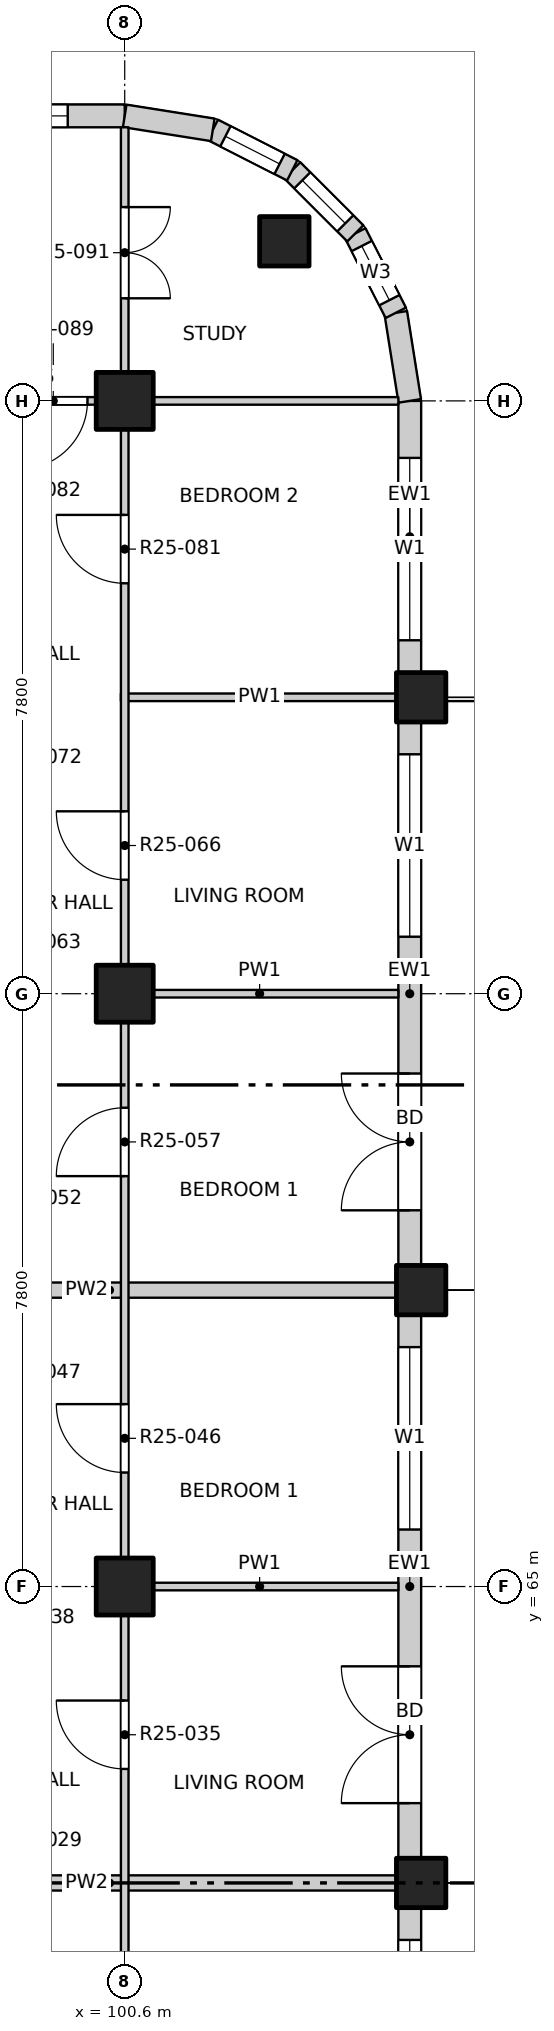
"""IFC4 building model, lengths in metres.
Left out: names, types, materials, properties, quantities, classifications, styles, units other than length and angle.
Written with IfcOpenShell. Run it as: python <this file> out.ifc"""

import sys

from ifc_helpers import new_model, si_unit, direction, frame, frame_2d, origin, origin_2d, place, context, subcontext, project, spatial, rectangle, extrude, element, fill, save


model = new_model("IFC4")
c1 = context("Model", 3, precision=1e-05, world=origin(), true_north=direction((0.0, 1.0)))
c2 = subcontext(c1, "Body", "Model", "MODEL_VIEW")
j1 = project(units=[si_unit("LENGTHUNIT", "METRE"), si_unit("PLANEANGLEUNIT", "RADIAN")], contexts=[c1])
p1 = place(None, origin())
s1 = spatial("IfcSite", under=j1, at=p1, CompositionType="ELEMENT")
p2 = place(p1, origin())
s2 = spatial("IfcBuilding", under=s1, at=p2, CompositionType="ELEMENT")
p3 = place(p2, frame((0.0, 0.0, 252.8)))
s3 = spatial("IfcBuildingStorey", under=s2, at=p3, CompositionType="ELEMENT", Elevation=252.8)
for number, where, z_axis, x_axis in (
    (1, (102.7, 82.7, -0.25), (0.0, 0.0, 1.0), (1.0, 0.0, 0.0)),
    (2, (104.5, 61.1, -0.25), (0.0, 0.0, 1.0), (1.0, 0.0, 0.0)),
    (3, (104.5, 68.9, -0.25), (0.0, 0.0, 1.0), (1.0, 0.0, 0.0)),
    (4, (104.5, 76.7, -0.25), (0.0, 0.0, 1.0), (1.0, 0.0, 0.0)),
):
    element("IfcColumn", number, at=place(p3, frame(where, z_axis=z_axis, x_axis=x_axis)), inside=s3, PredefinedType="COLUMN", context=c2, shape_type="SweptSolid", body=[
        extrude(rectangle(XDim=0.65, YDim=0.65, at=origin_2d()), origin(), (0.0, 0.0, 1.0), 3.4),
    ])
for number, where, z_axis, x_axis in (
    (5, (100.6, 65.0, -0.25), (0.0, 0.0, 1.0), (1.0, 0.0, 0.0)),
    (6, (100.6, 72.8, -0.25), (0.0, 0.0, 1.0), (1.0, 0.0, 0.0)),
    (7, (100.6, 80.6, -0.25), (0.0, 0.0, 1.0), (1.0, 0.0, 0.0)),
):
    element("IfcColumn", number, at=place(p3, frame(where, z_axis=z_axis, x_axis=x_axis)), inside=s3, PredefinedType="COLUMN", context=c2, shape_type="SweptSolid", body=[
        extrude(rectangle(XDim=0.75, YDim=0.75, at=origin_2d()), origin(), (0.0, 0.0, 1.0), 3.4),
    ])
p4 = place(p3, frame((104.35, 53.625, 0.0), z_axis=(0.0, 0.0, 1.0), x_axis=(0.0, 1.0, 0.0)))
e8 = element("IfcWall", 8, at=p4, inside=s3, PredefinedType="SOLIDWALL", context=c2, shape_type="SweptSolid", body=[
    extrude(rectangle(XDim=7.15, YDim=0.3, at=frame_2d((3.575, 0.0))), origin(), (0.0, 0.0, 1.0), 2.7),
])
p5 = place(p4, frame((0.725, 0.0, 0.0)))
e9 = element("IfcOpeningElement", 9, at=p5, cuts=e8, PredefinedType="OPENING", context=c2, shape_type="SweptSolid", body=[
    extrude(rectangle(XDim=1.8, YDim=2.4, at=frame_2d((0.9, 1.2))), frame((0.0, 0.16, 0.0), z_axis=(0.0, -1.0, 0.0), x_axis=(1.0, 0.0, 0.0)), (0.0, 0.0, 1.0), 0.32),
])
p6 = place(p4, frame((4.325, 0.0, 0.9)))
e10 = element("IfcOpeningElement", 10, at=p6, cuts=e8, PredefinedType="OPENING", context=c2, shape_type="SweptSolid", body=[
    extrude(rectangle(XDim=2.4, YDim=1.8, at=frame_2d((1.2, 0.9))), frame((0.0, 0.16, 0.0), z_axis=(0.0, -1.0, 0.0), x_axis=(1.0, 0.0, 0.0)), (0.0, 0.0, 1.0), 0.32),
])
p7 = place(p3, frame((104.35, 61.425, 0.0), z_axis=(0.0, 0.0, 1.0), x_axis=(0.0, 1.0, 0.0)))
e11 = element("IfcWall", 11, at=p7, inside=s3, PredefinedType="SOLIDWALL", context=c2, shape_type="SweptSolid", body=[
    extrude(rectangle(XDim=7.15, YDim=0.3, at=frame_2d((3.575, 0.0))), origin(), (0.0, 0.0, 1.0), 2.7),
])
p8 = place(p7, frame((0.725, 0.0, 0.0)))
e12 = element("IfcOpeningElement", 12, at=p8, cuts=e11, PredefinedType="OPENING", context=c2, shape_type="SweptSolid", body=[
    extrude(rectangle(XDim=1.8, YDim=2.4, at=frame_2d((0.9, 1.2))), frame((0.0, 0.16, 0.0), z_axis=(0.0, -1.0, 0.0), x_axis=(1.0, 0.0, 0.0)), (0.0, 0.0, 1.0), 0.32),
])
p9 = place(p7, frame((4.325, 0.0, 0.9)))
e13 = element("IfcOpeningElement", 13, at=p9, cuts=e11, PredefinedType="OPENING", context=c2, shape_type="SweptSolid", body=[
    extrude(rectangle(XDim=2.4, YDim=1.8, at=frame_2d((1.2, 0.9))), frame((0.0, 0.16, 0.0), z_axis=(0.0, -1.0, 0.0), x_axis=(1.0, 0.0, 0.0)), (0.0, 0.0, 1.0), 0.32),
])
p10 = place(p3, frame((104.35, 69.225, 0.0), z_axis=(0.0, 0.0, 1.0), x_axis=(0.0, 1.0, 0.0)))
e14 = element("IfcWall", 14, at=p10, inside=s3, PredefinedType="SOLIDWALL", context=c2, shape_type="SweptSolid", body=[
    extrude(rectangle(XDim=7.15, YDim=0.3, at=frame_2d((3.575, 0.0))), origin(), (0.0, 0.0, 1.0), 2.7),
])
p11 = place(p10, frame((0.725, 0.0, 0.0)))
e15 = element("IfcOpeningElement", 15, at=p11, cuts=e14, PredefinedType="OPENING", context=c2, shape_type="SweptSolid", body=[
    extrude(rectangle(XDim=1.8, YDim=2.4, at=frame_2d((0.9, 1.2))), frame((0.0, 0.16, 0.0), z_axis=(0.0, -1.0, 0.0), x_axis=(1.0, 0.0, 0.0)), (0.0, 0.0, 1.0), 0.32),
])
p12 = place(p10, frame((4.325, 0.0, 0.9)))
e16 = element("IfcOpeningElement", 16, at=p12, cuts=e14, PredefinedType="OPENING", context=c2, shape_type="SweptSolid", body=[
    extrude(rectangle(XDim=2.4, YDim=1.8, at=frame_2d((1.2, 0.9))), frame((0.0, 0.16, 0.0), z_axis=(0.0, -1.0, 0.0), x_axis=(1.0, 0.0, 0.0)), (0.0, 0.0, 1.0), 0.32),
])
p13 = place(p3, frame((104.35, 77.025, 0.0), z_axis=(0.0, 0.0, 1.0), x_axis=(0.0, 1.0, 0.0)))
e17 = element("IfcWall", 17, at=p13, inside=s3, PredefinedType="SOLIDWALL", context=c2, shape_type="SweptSolid", body=[
    extrude(rectangle(XDim=3.575, YDim=0.3, at=frame_2d((1.788, 0.0))), origin(), (0.0, 0.0, 1.0), 2.7),
])
p14 = place(p13, frame((0.425, 0.0, 0.9)))
e18 = element("IfcOpeningElement", 18, at=p14, cuts=e17, PredefinedType="OPENING", context=c2, shape_type="SweptSolid", body=[
    extrude(rectangle(XDim=2.4, YDim=1.8, at=frame_2d((1.2, 0.9))), frame((0.0, 0.16, 0.0), z_axis=(0.0, -1.0, 0.0), x_axis=(1.0, 0.0, 0.0)), (0.0, 0.0, 1.0), 0.32),
])
p15 = place(p3, frame((97.025, 84.35, 0.0), z_axis=(0.0, 0.0, 1.0), x_axis=(1.0, 0.0, 0.0)))
e19 = element("IfcWall", 19, at=p15, inside=s3, PredefinedType="SOLIDWALL", context=c2, shape_type="SweptSolid", body=[
    extrude(rectangle(XDim=3.575, YDim=0.3, at=frame_2d((1.788, 0.0))), origin(), (0.0, 0.0, 1.0), 2.7),
])
p16 = place(p15, frame((0.425, 0.0, 0.9)))
e20 = element("IfcOpeningElement", 20, at=p16, cuts=e19, PredefinedType="OPENING", context=c2, shape_type="SweptSolid", body=[
    extrude(rectangle(XDim=2.4, YDim=1.8, at=frame_2d((1.2, 0.9))), frame((0.0, 0.16, 0.0), z_axis=(0.0, -1.0, 0.0), x_axis=(1.0, 0.0, 0.0)), (0.0, 0.0, 1.0), 0.32),
])
p17 = place(p3, frame((104.35, 80.6, 0.0), z_axis=(0.0, 0.0, 1.0), x_axis=(-0.156496880861, 0.987678452879, 0.0)))
e21 = element("IfcWall", 21, at=p17, inside=s3, PredefinedType="SOLIDWALL", context=c2, shape_type="SweptSolid", body=[
    extrude(rectangle(XDim=1.173, YDim=0.3, at=frame_2d((0.586, 0.0))), origin(), (0.0, 0.0, 1.0), 2.7),
])
p18 = place(p3, frame((104.167, 81.759, 0.0), z_axis=(0.0, 0.0, 1.0), x_axis=(-0.454025524128, 0.890988677504, 0.0)))
e22 = element("IfcWall", 22, at=p18, inside=s3, PredefinedType="SOLIDWALL", context=c2, shape_type="SweptSolid", body=[
    extrude(rectangle(XDim=1.173, YDim=0.3, at=frame_2d((0.587, 0.0))), origin(), (0.0, 0.0, 1.0), 2.7),
])
p19 = place(p18, frame((0.187, 0.0, 0.9)))
e23 = element("IfcOpeningElement", 23, at=p19, cuts=e22, PredefinedType="OPENING", context=c2, shape_type="SweptSolid", body=[
    extrude(rectangle(XDim=0.8, YDim=1.2, at=frame_2d((0.4, 0.6))), frame((0.0, 0.16, 0.0), z_axis=(0.0, -1.0, 0.0), x_axis=(1.0, 0.0, 0.0)), (0.0, 0.0, 1.0), 0.32),
])
p20 = place(p3, frame((103.634, 82.804, 0.0), z_axis=(0.0, 0.0, 1.0), x_axis=(-0.707106781187, 0.707106781187, 0.0)))
e24 = element("IfcWall", 24, at=p20, inside=s3, PredefinedType="SOLIDWALL", context=c2, shape_type="SweptSolid", body=[
    extrude(rectangle(XDim=1.173, YDim=0.3, at=frame_2d((0.586, 0.0))), origin(), (0.0, 0.0, 1.0), 2.7),
])
p21 = place(p20, frame((0.187, 0.0, 0.9)))
e25 = element("IfcOpeningElement", 25, at=p21, cuts=e24, PredefinedType="OPENING", context=c2, shape_type="SweptSolid", body=[
    extrude(rectangle(XDim=0.8, YDim=1.2, at=frame_2d((0.4, 0.6))), frame((0.0, 0.16, 0.0), z_axis=(0.0, -1.0, 0.0), x_axis=(1.0, 0.0, 0.0)), (0.0, 0.0, 1.0), 0.32),
])
p22 = place(p3, frame((102.804, 83.634, 0.0), z_axis=(0.0, 0.0, 1.0), x_axis=(-0.890988677504, 0.454025524128, 0.0)))
e26 = element("IfcWall", 26, at=p22, inside=s3, PredefinedType="SOLIDWALL", context=c2, shape_type="SweptSolid", body=[
    extrude(rectangle(XDim=1.173, YDim=0.3, at=frame_2d((0.587, 0.0))), origin(), (0.0, 0.0, 1.0), 2.7),
])
p23 = place(p22, frame((0.187, 0.0, 0.9)))
e27 = element("IfcOpeningElement", 27, at=p23, cuts=e26, PredefinedType="OPENING", context=c2, shape_type="SweptSolid", body=[
    extrude(rectangle(XDim=0.8, YDim=1.2, at=frame_2d((0.4, 0.6))), frame((0.0, 0.16, 0.0), z_axis=(0.0, -1.0, 0.0), x_axis=(1.0, 0.0, 0.0)), (0.0, 0.0, 1.0), 0.32),
])
p24 = place(p3, frame((101.759, 84.167, 0.0), z_axis=(0.0, 0.0, 1.0), x_axis=(-0.987678452879, 0.156496880861, 0.0)))
e28 = element("IfcWall", 28, at=p24, inside=s3, PredefinedType="SOLIDWALL", context=c2, shape_type="SweptSolid", body=[
    extrude(rectangle(XDim=1.173, YDim=0.3, at=frame_2d((0.586, 0.0))), origin(), (0.0, 0.0, 1.0), 2.7),
])
p25 = place(p3, frame((96.6, 61.1, 0.0), z_axis=(0.0, 0.0, 1.0), x_axis=(1.0, 0.0, 0.0)))
e29 = element("IfcWall", 29, at=p25, inside=s3, PredefinedType="PARTITIONING", context=c2, shape_type="SweptSolid", body=[
    extrude(rectangle(XDim=7.6, YDim=0.2, at=frame_2d((3.8, 0.0))), origin(), (0.0, 0.0, 1.0), 2.55),
])
p26 = place(p3, frame((100.55, 65.0, 0.0), z_axis=(0.0, 0.0, 1.0), x_axis=(1.0, 0.0, 0.0)))
e30 = element("IfcWall", 30, at=p26, inside=s3, PredefinedType="PARTITIONING", context=c2, shape_type="SweptSolid", body=[
    extrude(rectangle(XDim=3.65, YDim=0.1, at=frame_2d((1.825, 0.0))), origin(), (0.0, 0.0, 1.0), 3.15),
])
p27 = place(p3, frame((96.6, 68.9, 0.0), z_axis=(0.0, 0.0, 1.0), x_axis=(1.0, 0.0, 0.0)))
e31 = element("IfcWall", 31, at=p27, inside=s3, PredefinedType="PARTITIONING", context=c2, shape_type="SweptSolid", body=[
    extrude(rectangle(XDim=7.6, YDim=0.2, at=frame_2d((3.8, 0.0))), origin(), (0.0, 0.0, 1.0), 2.55),
])
p28 = place(p3, frame((100.55, 72.8, 0.0), z_axis=(0.0, 0.0, 1.0), x_axis=(1.0, 0.0, 0.0)))
e32 = element("IfcWall", 32, at=p28, inside=s3, PredefinedType="PARTITIONING", context=c2, shape_type="SweptSolid", body=[
    extrude(rectangle(XDim=3.65, YDim=0.1, at=frame_2d((1.825, 0.0))), origin(), (0.0, 0.0, 1.0), 3.15),
])
p29 = place(p3, frame((100.55, 76.7, 0.0), z_axis=(0.0, 0.0, 1.0), x_axis=(1.0, 0.0, 0.0)))
e33 = element("IfcWall", 33, at=p29, inside=s3, PredefinedType="PARTITIONING", context=c2, shape_type="SweptSolid", body=[
    extrude(rectangle(XDim=3.65, YDim=0.1, at=frame_2d((1.825, 0.0))), origin(), (0.0, 0.0, 1.0), 2.55),
])
p30 = place(p3, frame((96.6, 80.6, 0.0), z_axis=(0.0, 0.0, 1.0), x_axis=(1.0, 0.0, 0.0)))
e34 = element("IfcWall", 34, at=p30, inside=s3, PredefinedType="PARTITIONING", context=c2, shape_type="SweptSolid", body=[
    extrude(rectangle(XDim=7.6, YDim=0.1, at=frame_2d((3.8, 0.0))), origin(), (0.0, 0.0, 1.0), 3.15),
])
p31 = place(p30, frame((2.61, 0.0, 0.0)))
e35 = element("IfcOpeningElement", 35, at=p31, cuts=e34, PredefinedType="OPENING", context=c2, shape_type="SweptSolid", body=[
    extrude(rectangle(XDim=0.9, YDim=2.1, at=frame_2d((0.45, 1.05))), frame((0.0, 0.06, 0.0), z_axis=(0.0, -1.0, 0.0), x_axis=(1.0, 0.0, 0.0)), (0.0, 0.0, 1.0), 0.12),
])
p32 = place(p3, frame((100.6, 45.8, 0.0), z_axis=(0.0, 0.0, 1.0), x_axis=(0.0, 1.0, 0.0)))
e36 = element("IfcWall", 36, at=p32, inside=s3, PredefinedType="PARTITIONING", context=c2, shape_type="SweptSolid", body=[
    extrude(rectangle(XDim=38.4, YDim=0.1, at=frame_2d((19.2, 0.0))), origin(), (0.0, 0.0, 1.0), 3.15),
])
p33 = place(p32, frame((1.05, 0.0, 0.0)))
e37 = element("IfcOpeningElement", 37, at=p33, cuts=e36, PredefinedType="OPENING", context=c2, shape_type="SweptSolid", body=[
    extrude(rectangle(XDim=1.2, YDim=2.1, at=frame_2d((0.6, 1.05))), frame((0.0, 0.06, 0.0), z_axis=(0.0, -1.0, 0.0), x_axis=(1.0, 0.0, 0.0)), (0.0, 0.0, 1.0), 0.12),
])
p34 = place(p32, frame((5.1, 0.0, 0.0)))
e38 = element("IfcOpeningElement", 38, at=p34, cuts=e36, PredefinedType="OPENING", context=c2, shape_type="SweptSolid", body=[
    extrude(rectangle(XDim=0.9, YDim=2.1, at=frame_2d((0.45, 1.05))), frame((0.0, 0.06, 0.0), z_axis=(0.0, -1.0, 0.0), x_axis=(1.0, 0.0, 0.0)), (0.0, 0.0, 1.0), 0.12),
])
p35 = place(p32, frame((9.0, 0.0, 0.0)))
e39 = element("IfcOpeningElement", 39, at=p35, cuts=e36, PredefinedType="OPENING", context=c2, shape_type="SweptSolid", body=[
    extrude(rectangle(XDim=0.9, YDim=2.1, at=frame_2d((0.45, 1.05))), frame((0.0, 0.06, 0.0), z_axis=(0.0, -1.0, 0.0), x_axis=(1.0, 0.0, 0.0)), (0.0, 0.0, 1.0), 0.12),
])
p36 = place(p32, frame((12.9, 0.0, 0.0)))
e40 = element("IfcOpeningElement", 40, at=p36, cuts=e36, PredefinedType="OPENING", context=c2, shape_type="SweptSolid", body=[
    extrude(rectangle(XDim=0.9, YDim=2.1, at=frame_2d((0.45, 1.05))), frame((0.0, 0.06, 0.0), z_axis=(0.0, -1.0, 0.0), x_axis=(1.0, 0.0, 0.0)), (0.0, 0.0, 1.0), 0.12),
])
p37 = place(p32, frame((16.8, 0.0, 0.0)))
e41 = element("IfcOpeningElement", 41, at=p37, cuts=e36, PredefinedType="OPENING", context=c2, shape_type="SweptSolid", body=[
    extrude(rectangle(XDim=0.9, YDim=2.1, at=frame_2d((0.45, 1.05))), frame((0.0, 0.06, 0.0), z_axis=(0.0, -1.0, 0.0), x_axis=(1.0, 0.0, 0.0)), (0.0, 0.0, 1.0), 0.12),
])
p38 = place(p32, frame((20.7, 0.0, 0.0)))
e42 = element("IfcOpeningElement", 42, at=p38, cuts=e36, PredefinedType="OPENING", context=c2, shape_type="SweptSolid", body=[
    extrude(rectangle(XDim=0.9, YDim=2.1, at=frame_2d((0.45, 1.05))), frame((0.0, 0.06, 0.0), z_axis=(0.0, -1.0, 0.0), x_axis=(1.0, 0.0, 0.0)), (0.0, 0.0, 1.0), 0.12),
])
p39 = place(p32, frame((24.6, 0.0, 0.0)))
e43 = element("IfcOpeningElement", 43, at=p39, cuts=e36, PredefinedType="OPENING", context=c2, shape_type="SweptSolid", body=[
    extrude(rectangle(XDim=0.9, YDim=2.1, at=frame_2d((0.45, 1.05))), frame((0.0, 0.06, 0.0), z_axis=(0.0, -1.0, 0.0), x_axis=(1.0, 0.0, 0.0)), (0.0, 0.0, 1.0), 0.12),
])
p40 = place(p32, frame((28.5, 0.0, 0.0)))
e44 = element("IfcOpeningElement", 44, at=p40, cuts=e36, PredefinedType="OPENING", context=c2, shape_type="SweptSolid", body=[
    extrude(rectangle(XDim=0.9, YDim=2.1, at=frame_2d((0.45, 1.05))), frame((0.0, 0.06, 0.0), z_axis=(0.0, -1.0, 0.0), x_axis=(1.0, 0.0, 0.0)), (0.0, 0.0, 1.0), 0.12),
])
p41 = place(p32, frame((32.4, 0.0, 0.0)))
e45 = element("IfcOpeningElement", 45, at=p41, cuts=e36, PredefinedType="OPENING", context=c2, shape_type="SweptSolid", body=[
    extrude(rectangle(XDim=0.9, YDim=2.1, at=frame_2d((0.45, 1.05))), frame((0.0, 0.06, 0.0), z_axis=(0.0, -1.0, 0.0), x_axis=(1.0, 0.0, 0.0)), (0.0, 0.0, 1.0), 0.12),
])
p42 = place(p32, frame((36.15, 0.0, 0.0)))
e46 = element("IfcOpeningElement", 46, at=p42, cuts=e36, PredefinedType="OPENING", context=c2, shape_type="SweptSolid", body=[
    extrude(rectangle(XDim=1.2, YDim=2.1, at=frame_2d((0.6, 1.05))), frame((0.0, 0.06, 0.0), z_axis=(0.0, -1.0, 0.0), x_axis=(1.0, 0.0, 0.0)), (0.0, 0.0, 1.0), 0.12),
])
p43 = place(p6, origin())
e47 = element("IfcWindow", 47, at=p43, inside=s3, PartitioningType="DOUBLE_PANEL_VERTICAL", PredefinedType="WINDOW", context=c2, shape_type="SweptSolid", body=[
    extrude(rectangle(XDim=2.4, YDim=1.8, at=frame_2d((1.2, 0.9))), frame((0.0, 0.03, 0.0), z_axis=(0.0, -1.0, 0.0), x_axis=(1.0, 0.0, 0.0)), (0.0, 0.0, 1.0), 0.06),
])
fill(e10, e47)
p44 = place(p8, origin())
e48 = element("IfcDoor", 48, at=p44, inside=s3, OperationType="DOUBLE_DOOR_SINGLE_SWING", PredefinedType="DOOR", context=c2, shape_type="SweptSolid", body=[
    extrude(rectangle(XDim=1.8, YDim=2.4, at=frame_2d((0.9, 1.2))), frame((0.0, 0.025, 0.0), z_axis=(0.0, -1.0, 0.0), x_axis=(1.0, 0.0, 0.0)), (0.0, 0.0, 1.0), 0.05),
])
fill(e12, e48)
p45 = place(p9, origin())
e49 = element("IfcWindow", 49, at=p45, inside=s3, PartitioningType="DOUBLE_PANEL_VERTICAL", PredefinedType="WINDOW", context=c2, shape_type="SweptSolid", body=[
    extrude(rectangle(XDim=2.4, YDim=1.8, at=frame_2d((1.2, 0.9))), frame((0.0, 0.03, 0.0), z_axis=(0.0, -1.0, 0.0), x_axis=(1.0, 0.0, 0.0)), (0.0, 0.0, 1.0), 0.06),
])
fill(e13, e49)
p46 = place(p11, origin())
e50 = element("IfcDoor", 50, at=p46, inside=s3, OperationType="DOUBLE_DOOR_SINGLE_SWING", PredefinedType="DOOR", context=c2, shape_type="SweptSolid", body=[
    extrude(rectangle(XDim=1.8, YDim=2.4, at=frame_2d((0.9, 1.2))), frame((0.0, 0.025, 0.0), z_axis=(0.0, -1.0, 0.0), x_axis=(1.0, 0.0, 0.0)), (0.0, 0.0, 1.0), 0.05),
])
fill(e15, e50)
p47 = place(p12, origin())
e51 = element("IfcWindow", 51, at=p47, inside=s3, PartitioningType="DOUBLE_PANEL_VERTICAL", PredefinedType="WINDOW", context=c2, shape_type="SweptSolid", body=[
    extrude(rectangle(XDim=2.4, YDim=1.8, at=frame_2d((1.2, 0.9))), frame((0.0, 0.03, 0.0), z_axis=(0.0, -1.0, 0.0), x_axis=(1.0, 0.0, 0.0)), (0.0, 0.0, 1.0), 0.06),
])
fill(e16, e51)
p48 = place(p14, origin())
e52 = element("IfcWindow", 52, at=p48, inside=s3, PartitioningType="DOUBLE_PANEL_VERTICAL", PredefinedType="WINDOW", context=c2, shape_type="SweptSolid", body=[
    extrude(rectangle(XDim=2.4, YDim=1.8, at=frame_2d((1.2, 0.9))), frame((0.0, 0.03, 0.0), z_axis=(0.0, -1.0, 0.0), x_axis=(1.0, 0.0, 0.0)), (0.0, 0.0, 1.0), 0.06),
])
fill(e18, e52)
p49 = place(p16, origin())
e53 = element("IfcWindow", 53, at=p49, inside=s3, PartitioningType="DOUBLE_PANEL_VERTICAL", PredefinedType="WINDOW", context=c2, shape_type="SweptSolid", body=[
    extrude(rectangle(XDim=2.4, YDim=1.8, at=frame_2d((1.2, 0.9))), frame((0.0, 0.03, 0.0), z_axis=(0.0, -1.0, 0.0), x_axis=(1.0, 0.0, 0.0)), (0.0, 0.0, 1.0), 0.06),
])
fill(e20, e53)
p50 = place(p19, origin())
e54 = element("IfcWindow", 54, at=p50, inside=s3, PartitioningType="SINGLE_PANEL", PredefinedType="WINDOW", context=c2, shape_type="SweptSolid", body=[
    extrude(rectangle(XDim=0.8, YDim=1.2, at=frame_2d((0.4, 0.6))), frame((0.0, 0.03, 0.0), z_axis=(0.0, -1.0, 0.0), x_axis=(1.0, 0.0, 0.0)), (0.0, 0.0, 1.0), 0.06),
])
fill(e23, e54)
p51 = place(p21, origin())
e55 = element("IfcWindow", 55, at=p51, inside=s3, PartitioningType="SINGLE_PANEL", PredefinedType="WINDOW", context=c2, shape_type="SweptSolid", body=[
    extrude(rectangle(XDim=0.8, YDim=1.2, at=frame_2d((0.4, 0.6))), frame((0.0, 0.03, 0.0), z_axis=(0.0, -1.0, 0.0), x_axis=(1.0, 0.0, 0.0)), (0.0, 0.0, 1.0), 0.06),
])
fill(e25, e55)
p52 = place(p23, origin())
e56 = element("IfcWindow", 56, at=p52, inside=s3, PartitioningType="SINGLE_PANEL", PredefinedType="WINDOW", context=c2, shape_type="SweptSolid", body=[
    extrude(rectangle(XDim=0.8, YDim=1.2, at=frame_2d((0.4, 0.6))), frame((0.0, 0.03, 0.0), z_axis=(0.0, -1.0, 0.0), x_axis=(1.0, 0.0, 0.0)), (0.0, 0.0, 1.0), 0.06),
])
fill(e27, e56)
p53 = place(p37, origin())
e57 = element("IfcDoor", 57, at=p53, inside=s3, OperationType="SINGLE_SWING_RIGHT", PredefinedType="DOOR", context=c2, shape_type="SweptSolid", body=[
    extrude(rectangle(XDim=0.9, YDim=2.1, at=frame_2d((0.45, 1.05))), frame((0.0, 0.025, 0.0), z_axis=(0.0, -1.0, 0.0), x_axis=(1.0, 0.0, 0.0)), (0.0, 0.0, 1.0), 0.05),
])
fill(e41, e57)
p54 = place(p38, origin())
e58 = element("IfcDoor", 58, at=p54, inside=s3, OperationType="SINGLE_SWING_RIGHT", PredefinedType="DOOR", context=c2, shape_type="SweptSolid", body=[
    extrude(rectangle(XDim=0.9, YDim=2.1, at=frame_2d((0.45, 1.05))), frame((0.0, 0.025, 0.0), z_axis=(0.0, -1.0, 0.0), x_axis=(1.0, 0.0, 0.0)), (0.0, 0.0, 1.0), 0.05),
])
fill(e42, e58)
p55 = place(p39, origin())
e59 = element("IfcDoor", 59, at=p55, inside=s3, OperationType="SINGLE_SWING_LEFT", PredefinedType="DOOR", context=c2, shape_type="SweptSolid", body=[
    extrude(rectangle(XDim=0.9, YDim=2.1, at=frame_2d((0.45, 1.05))), frame((0.0, 0.025, 0.0), z_axis=(0.0, -1.0, 0.0), x_axis=(1.0, 0.0, 0.0)), (0.0, 0.0, 1.0), 0.05),
])
fill(e43, e59)
p56 = place(p40, origin())
e60 = element("IfcDoor", 60, at=p56, inside=s3, OperationType="SINGLE_SWING_RIGHT", PredefinedType="DOOR", context=c2, shape_type="SweptSolid", body=[
    extrude(rectangle(XDim=0.9, YDim=2.1, at=frame_2d((0.45, 1.05))), frame((0.0, 0.025, 0.0), z_axis=(0.0, -1.0, 0.0), x_axis=(1.0, 0.0, 0.0)), (0.0, 0.0, 1.0), 0.05),
])
fill(e44, e60)
p57 = place(p41, origin())
e61 = element("IfcDoor", 61, at=p57, inside=s3, OperationType="SINGLE_SWING_RIGHT", PredefinedType="DOOR", context=c2, shape_type="SweptSolid", body=[
    extrude(rectangle(XDim=0.9, YDim=2.1, at=frame_2d((0.45, 1.05))), frame((0.0, 0.025, 0.0), z_axis=(0.0, -1.0, 0.0), x_axis=(1.0, 0.0, 0.0)), (0.0, 0.0, 1.0), 0.05),
])
fill(e45, e61)
p58 = place(p31, origin())
e62 = element("IfcDoor", 62, at=p58, inside=s3, OperationType="SINGLE_SWING_RIGHT", PredefinedType="DOOR", context=c2, shape_type="SweptSolid", body=[
    extrude(rectangle(XDim=0.9, YDim=2.1, at=frame_2d((0.45, 1.05))), frame((0.0, 0.025, 0.0), z_axis=(0.0, -1.0, 0.0), x_axis=(1.0, 0.0, 0.0)), (0.0, 0.0, 1.0), 0.05),
])
fill(e35, e62)
p59 = place(p42, origin())
e63 = element("IfcDoor", 63, at=p59, inside=s3, OperationType="DOUBLE_DOOR_SINGLE_SWING", PredefinedType="DOOR", context=c2, shape_type="SweptSolid", body=[
    extrude(rectangle(XDim=1.2, YDim=2.1, at=frame_2d((0.6, 1.05))), frame((0.0, 0.025, 0.0), z_axis=(0.0, -1.0, 0.0), x_axis=(1.0, 0.0, 0.0)), (0.0, 0.0, 1.0), 0.05),
])
fill(e46, e63)
save(model, sys.argv[1])
